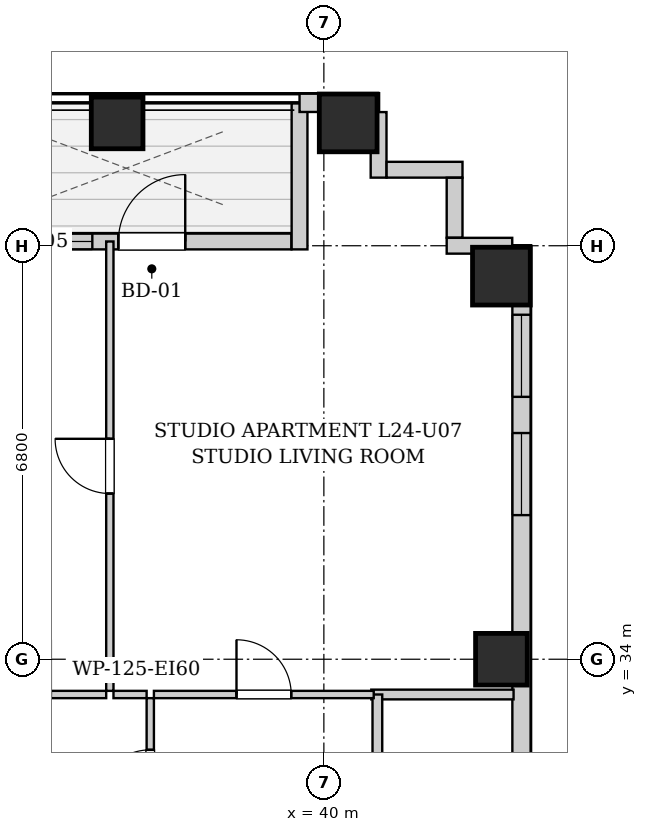
"""IFC4 building model, lengths in metres.
Left out: names, types, materials, properties, quantities, classifications, styles, units other than length and angle.
Written with IfcOpenShell. Run it as: python <this file> out.ifc"""

import sys

from ifc_helpers import new_model, si_unit, direction, frame, frame_2d, origin, origin_2d, place, context, subcontext, project, spatial, rectangle, extrude, element, fill, save


model = new_model("IFC4")
c1 = context("Model", 3, precision=1e-05, world=origin(), true_north=direction((0.0, 1.0)))
c2 = subcontext(c1, "Body", "Model", "MODEL_VIEW")
j1 = project(units=[si_unit("LENGTHUNIT", "METRE"), si_unit("PLANEANGLEUNIT", "RADIAN")], contexts=[c1])
p1 = place(None, origin())
s1 = spatial("IfcSite", under=j1, at=p1, CompositionType="ELEMENT")
p2 = place(p1, origin())
s2 = spatial("IfcBuilding", under=s1, at=p2, CompositionType="ELEMENT")
p3 = place(p2, frame((0.0, 0.0, 87.9)))
s3 = spatial("IfcBuildingStorey", under=s2, at=p3, CompositionType="ELEMENT", Elevation=87.9)
p4 = place(p3, frame((36.6, 42.82, 0.0), z_axis=(0.0, 0.0, 1.0), x_axis=(1.0, 0.0, 0.0)))
e1 = element("IfcColumn", 1, at=p4, inside=s3, PredefinedType="COLUMN", context=c2, shape_type="SweptSolid", body=[
    extrude(rectangle(XDim=0.85, YDim=0.85, at=origin_2d()), origin(), (0.0, 0.0, 1.0), 3.2),
])
p5 = place(p3, frame((40.4, 42.82, 0.0), z_axis=(0.0, 0.0, 1.0), x_axis=(1.0, 0.0, 0.0)))
e2 = element("IfcColumn", 2, at=p5, inside=s3, PredefinedType="COLUMN", context=c2, shape_type="SweptSolid", body=[
    extrude(rectangle(XDim=0.95, YDim=0.95, at=origin_2d()), origin(), (0.0, 0.0, 1.0), 3.2),
])
p6 = place(p3, frame((42.92, 34.0, 0.0), z_axis=(0.0, 0.0, 1.0), x_axis=(1.0, 0.0, 0.0)))
e3 = element("IfcColumn", 3, at=p6, inside=s3, PredefinedType="COLUMN", context=c2, shape_type="SweptSolid", body=[
    extrude(rectangle(XDim=0.85, YDim=0.85, at=origin_2d()), origin(), (0.0, 0.0, 1.0), 3.2),
])
p7 = place(p3, frame((42.92, 40.3, 0.0), z_axis=(0.0, 0.0, 1.0), x_axis=(1.0, 0.0, 0.0)))
e4 = element("IfcColumn", 4, at=p7, inside=s3, PredefinedType="COLUMN", context=c2, shape_type="SweptSolid", body=[
    extrude(rectangle(XDim=0.95, YDim=0.95, at=origin_2d()), origin(), (0.0, 0.0, 1.0), 3.2),
])
p8 = place(p3, frame((34.034, 40.87, 0.0), z_axis=(0.0, 0.0, 1.0), x_axis=(1.0, 0.0, 0.0)))
e5 = element("IfcWall", 5, at=p8, inside=s3, PredefinedType="SOLIDWALL", context=c2, shape_type="SweptSolid", body=[
    extrude(rectangle(XDim=5.432, YDim=0.26, at=frame_2d((2.716, 0.0))), origin(), (0.0, 0.0, 1.0), 2.94),
])
p9 = place(p8, frame((2.586, 0.0, 0.0)))
e6 = element("IfcOpeningElement", 6, at=p9, cuts=e5, PredefinedType="OPENING", context=c2, shape_type="SweptSolid", body=[
    extrude(rectangle(XDim=1.1, YDim=2.0, at=frame_2d((0.55, 1.0))), frame((0.0, 0.14, 0.0), z_axis=(0.0, -1.0, 0.0), x_axis=(1.0, 0.0, 0.0)), (0.0, 0.0, 1.0), 0.28),
])
p10 = place(p8, frame((0.558, 0.0, 0.85)))
e7 = element("IfcOpeningElement", 7, at=p10, cuts=e5, PredefinedType="OPENING", context=c2, shape_type="SweptSolid", body=[
    extrude(rectangle(XDim=1.6, YDim=1.65, at=frame_2d((0.8, 0.825))), frame((0.0, 0.14, 0.0), z_axis=(0.0, -1.0, 0.0), x_axis=(1.0, 0.0, 0.0)), (0.0, 0.0, 1.0), 0.28),
])
p11 = place(p3, frame((39.6, 40.74, 0.0), z_axis=(0.0, 0.0, 1.0), x_axis=(0.0, 1.0, 0.0)))
e8 = element("IfcWall", 8, at=p11, inside=s3, PredefinedType="SOLIDWALL", context=c2, shape_type="SweptSolid", body=[
    extrude(rectangle(XDim=2.4, YDim=0.26, at=frame_2d((1.2, 0.0))), origin(), (0.0, 0.0, 1.0), 2.94),
])
p12 = place(p3, frame((39.6, 43.15, 0.0), z_axis=(0.0, 0.0, 1.0), x_axis=(1.0, 0.0, 0.0)))
e9 = element("IfcWall", 9, at=p12, inside=s3, PredefinedType="SOLIDWALL", context=c2, shape_type="SweptSolid", body=[
    extrude(rectangle(XDim=1.3, YDim=0.3, at=frame_2d((0.65, 0.0))), origin(), (0.0, 0.0, 1.0), 2.94),
])
p13 = place(p3, frame((43.25, 40.8, 0.0), z_axis=(0.0, 0.0, 1.0), x_axis=(0.0, -1.0, 0.0)))
e10 = element("IfcWall", 10, at=p13, inside=s3, PredefinedType="SOLIDWALL", context=c2, shape_type="SweptSolid", body=[
    extrude(rectangle(XDim=38.3, YDim=0.3, at=frame_2d((19.15, 0.0))), origin(), (0.0, 0.0, 1.0), 2.94),
])
p14 = place(p13, frame((33.495, 0.0, 0.55)))
e11 = element("IfcOpeningElement", 11, at=p14, cuts=e10, PredefinedType="OPENING", context=c2, shape_type="SweptSolid", body=[
    extrude(rectangle(XDim=1.35, YDim=1.2, at=frame_2d((0.675, 0.6))), frame((0.0, 0.16, 0.0), z_axis=(0.0, -1.0, 0.0), x_axis=(1.0, 0.0, 0.0)), (0.0, 0.0, 1.0), 0.32),
])
p15 = place(p13, frame((31.785, 0.0, 0.55)))
e12 = element("IfcOpeningElement", 12, at=p15, cuts=e10, PredefinedType="OPENING", context=c2, shape_type="SweptSolid", body=[
    extrude(rectangle(XDim=1.35, YDim=1.2, at=frame_2d((0.675, 0.6))), frame((0.0, 0.16, 0.0), z_axis=(0.0, -1.0, 0.0), x_axis=(1.0, 0.0, 0.0)), (0.0, 0.0, 1.0), 0.32),
])
p16 = place(p13, frame((3.08, 0.0, 0.55)))
e13 = element("IfcOpeningElement", 13, at=p16, cuts=e10, PredefinedType="OPENING", context=c2, shape_type="SweptSolid", body=[
    extrude(rectangle(XDim=1.35, YDim=1.2, at=frame_2d((0.675, 0.6))), frame((0.0, 0.16, 0.0), z_axis=(0.0, -1.0, 0.0), x_axis=(1.0, 0.0, 0.0)), (0.0, 0.0, 1.0), 0.32),
])
p17 = place(p13, frame((1.135, 0.0, 0.55)))
e14 = element("IfcOpeningElement", 14, at=p17, cuts=e10, PredefinedType="OPENING", context=c2, shape_type="SweptSolid", body=[
    extrude(rectangle(XDim=1.35, YDim=1.2, at=frame_2d((0.675, 0.6))), frame((0.0, 0.16, 0.0), z_axis=(0.0, -1.0, 0.0), x_axis=(1.0, 0.0, 0.0)), (0.0, 0.0, 1.0), 0.32),
])
p18 = place(p13, frame((21.93, 0.0, 0.55)))
e15 = element("IfcOpeningElement", 15, at=p18, cuts=e10, PredefinedType="OPENING", context=c2, shape_type="SweptSolid", body=[
    extrude(rectangle(XDim=1.35, YDim=1.2, at=frame_2d((0.675, 0.6))), frame((0.0, 0.16, 0.0), z_axis=(0.0, -1.0, 0.0), x_axis=(1.0, 0.0, 0.0)), (0.0, 0.0, 1.0), 0.32),
])
p19 = place(p13, frame((23.54, 0.0, 0.55)))
e16 = element("IfcOpeningElement", 16, at=p19, cuts=e10, PredefinedType="OPENING", context=c2, shape_type="SweptSolid", body=[
    extrude(rectangle(XDim=1.35, YDim=1.2, at=frame_2d((0.675, 0.6))), frame((0.0, 0.16, 0.0), z_axis=(0.0, -1.0, 0.0), x_axis=(1.0, 0.0, 0.0)), (0.0, 0.0, 1.0), 0.32),
])
p20 = place(p13, frame((14.95, 0.0, 0.55)))
e17 = element("IfcOpeningElement", 17, at=p20, cuts=e10, PredefinedType="OPENING", context=c2, shape_type="SweptSolid", body=[
    extrude(rectangle(XDim=1.35, YDim=1.2, at=frame_2d((0.675, 0.6))), frame((0.0, 0.16, 0.0), z_axis=(0.0, -1.0, 0.0), x_axis=(1.0, 0.0, 0.0)), (0.0, 0.0, 1.0), 0.32),
])
p21 = place(p13, frame((12.385, 0.0, 0.55)))
e18 = element("IfcOpeningElement", 18, at=p21, cuts=e10, PredefinedType="OPENING", context=c2, shape_type="SweptSolid", body=[
    extrude(rectangle(XDim=1.35, YDim=1.2, at=frame_2d((0.675, 0.6))), frame((0.0, 0.16, 0.0), z_axis=(0.0, -1.0, 0.0), x_axis=(1.0, 0.0, 0.0)), (0.0, 0.0, 1.0), 0.32),
])
p22 = place(p3, frame((40.9, 42.998, 0.0), z_axis=(0.0, 0.0, 1.0), x_axis=(0.0, -1.0, 0.0)))
e19 = element("IfcWall", 19, at=p22, inside=s3, PredefinedType="SOLIDWALL", context=c2, shape_type="SweptSolid", body=[
    extrude(rectangle(XDim=1.078, YDim=0.26, at=frame_2d((0.539, 0.0))), origin(), (0.0, 0.0, 1.0), 2.94),
])
p23 = place(p3, frame((41.032, 42.05, 0.0), z_axis=(0.0, 0.0, 1.0), x_axis=(1.0, 0.0, 0.0)))
e20 = element("IfcWall", 20, at=p23, inside=s3, PredefinedType="SOLIDWALL", context=c2, shape_type="SweptSolid", body=[
    extrude(rectangle(XDim=1.248, YDim=0.26, at=frame_2d((0.624, 0.0))), origin(), (0.0, 0.0, 1.0), 2.94),
])
p24 = place(p3, frame((42.15, 41.918, 0.0), z_axis=(0.0, 0.0, 1.0), x_axis=(0.0, -1.0, 0.0)))
e21 = element("IfcWall", 21, at=p24, inside=s3, PredefinedType="SOLIDWALL", context=c2, shape_type="SweptSolid", body=[
    extrude(rectangle(XDim=0.986, YDim=0.26, at=frame_2d((0.493, 0.0))), origin(), (0.0, 0.0, 1.0), 2.94),
])
p25 = place(p3, frame((42.02, 40.8, 0.0), z_axis=(0.0, 0.0, 1.0), x_axis=(1.0, 0.0, 0.0)))
e22 = element("IfcWall", 22, at=p25, inside=s3, PredefinedType="SOLIDWALL", context=c2, shape_type="SweptSolid", body=[
    extrude(rectangle(XDim=1.078, YDim=0.26, at=frame_2d((0.539, 0.0))), origin(), (0.0, 0.0, 1.0), 2.94),
])
p26 = place(p3, frame((40.78, 33.42, 0.0), z_axis=(0.0, 0.0, 1.0), x_axis=(1.0, 0.0, 0.0)))
e23 = element("IfcWall", 23, at=p26, inside=s3, PredefinedType="PARTITIONING", context=c2, shape_type="SweptSolid", body=[
    extrude(rectangle(XDim=2.34, YDim=0.16, at=frame_2d((1.17, 0.0))), origin(), (0.0, 0.0, 1.0), 2.94),
])
p27 = place(p3, frame((40.88, 30.76, 0.0), z_axis=(0.0, 0.0, 1.0), x_axis=(0.0, 1.0, 0.0)))
e24 = element("IfcWall", 24, at=p27, inside=s3, PredefinedType="PARTITIONING", context=c2, shape_type="SweptSolid", body=[
    extrude(rectangle(XDim=2.66, YDim=0.16, at=frame_2d((1.33, 0.0))), origin(), (0.0, 0.0, 1.0), 2.94),
])
p28 = place(p3, frame((37.145, 30.76, 0.0), z_axis=(0.0, 0.0, 1.0), x_axis=(0.0, 1.0, 0.0)))
e25 = element("IfcWall", 25, at=p28, inside=s3, PredefinedType="PARTITIONING", context=c2, shape_type="SweptSolid", body=[
    extrude(rectangle(XDim=2.6, YDim=0.12, at=frame_2d((1.3, 0.0))), origin(), (0.0, 0.0, 1.0), 2.94),
])
p29 = place(p28, frame((0.85, 0.0, 0.0)))
e26 = element("IfcOpeningElement", 26, at=p29, cuts=e25, PredefinedType="OPENING", context=c2, shape_type="SweptSolid", body=[
    extrude(rectangle(XDim=0.9, YDim=2.05, at=frame_2d((0.45, 1.025))), frame((0.0, 0.07, 0.0), z_axis=(0.0, -1.0, 0.0), x_axis=(1.0, 0.0, 0.0)), (0.0, 0.0, 1.0), 0.14),
])
p30 = place(p3, frame((33.7, 33.42, 0.0), z_axis=(0.0, 0.0, 1.0), x_axis=(1.0, 0.0, 0.0)))
e27 = element("IfcWall", 27, at=p30, inside=s3, PredefinedType="PARTITIONING", context=c2, shape_type="SweptSolid", body=[
    extrude(rectangle(XDim=2.72, YDim=0.12, at=frame_2d((1.36, 0.0))), origin(), (0.0, 0.0, 1.0), 2.94),
])
p31 = place(p30, frame((0.91, 0.0, 0.0)))
e28 = element("IfcOpeningElement", 28, at=p31, cuts=e27, PredefinedType="OPENING", context=c2, shape_type="SweptSolid", body=[
    extrude(rectangle(XDim=0.9, YDim=2.05, at=frame_2d((0.45, 1.025))), frame((0.0, 0.07, 0.0), z_axis=(0.0, -1.0, 0.0), x_axis=(1.0, 0.0, 0.0)), (0.0, 0.0, 1.0), 0.14),
])
p32 = place(p3, frame((36.54, 33.42, 0.0), z_axis=(0.0, 0.0, 1.0), x_axis=(1.0, 0.0, 0.0)))
e29 = element("IfcWall", 29, at=p32, inside=s3, PredefinedType="PARTITIONING", context=c2, shape_type="SweptSolid", body=[
    extrude(rectangle(XDim=0.545, YDim=0.12, at=frame_2d((0.272, 0.0))), origin(), (0.0, 0.0, 1.0), 2.94),
])
p33 = place(p3, frame((37.205, 33.42, 0.0), z_axis=(0.0, 0.0, 1.0), x_axis=(1.0, 0.0, 0.0)))
e30 = element("IfcWall", 30, at=p33, inside=s3, PredefinedType="PARTITIONING", context=c2, shape_type="SweptSolid", body=[
    extrude(rectangle(XDim=3.615, YDim=0.12, at=frame_2d((1.808, 0.0))), origin(), (0.0, 0.0, 1.0), 2.94),
])
p34 = place(p33, frame((1.358, 0.0, 0.0)))
e31 = element("IfcOpeningElement", 31, at=p34, cuts=e30, PredefinedType="OPENING", context=c2, shape_type="SweptSolid", body=[
    extrude(rectangle(XDim=0.9, YDim=2.05, at=frame_2d((0.45, 1.025))), frame((0.0, 0.07, 0.0), z_axis=(0.0, -1.0, 0.0), x_axis=(1.0, 0.0, 0.0)), (0.0, 0.0, 1.0), 0.14),
])
p35 = place(p3, frame((36.48, 33.48, 0.0), z_axis=(0.0, 0.0, 1.0), x_axis=(0.0, 1.0, 0.0)))
e32 = element("IfcWall", 32, at=p35, inside=s3, PredefinedType="PARTITIONING", context=c2, shape_type="SweptSolid", body=[
    extrude(rectangle(XDim=7.39, YDim=0.12, at=frame_2d((3.695, 0.0))), origin(), (0.0, 0.0, 1.0), 2.94),
])
p36 = place(p35, frame((3.245, 0.0, 0.0)))
e33 = element("IfcOpeningElement", 33, at=p36, cuts=e32, PredefinedType="OPENING", context=c2, shape_type="SweptSolid", body=[
    extrude(rectangle(XDim=0.9, YDim=2.05, at=frame_2d((0.45, 1.025))), frame((0.0, 0.07, 0.0), z_axis=(0.0, -1.0, 0.0), x_axis=(1.0, 0.0, 0.0)), (0.0, 0.0, 1.0), 0.14),
])
p37 = place(p29, origin())
e34 = element("IfcDoor", 34, at=p37, inside=s3, OperationType="SINGLE_SWING_LEFT", PredefinedType="DOOR", context=c2, shape_type="SweptSolid", body=[
    extrude(rectangle(XDim=0.9, YDim=2.05, at=frame_2d((0.45, 1.025))), frame((0.0, 0.025, 0.0), z_axis=(0.0, -1.0, 0.0), x_axis=(1.0, 0.0, 0.0)), (0.0, 0.0, 1.0), 0.05),
])
fill(e26, e34)
p38 = place(p34, origin())
e35 = element("IfcDoor", 35, at=p38, inside=s3, OperationType="SINGLE_SWING_LEFT", PredefinedType="DOOR", context=c2, shape_type="SweptSolid", body=[
    extrude(rectangle(XDim=0.9, YDim=2.05, at=frame_2d((0.45, 1.025))), frame((0.0, 0.025, 0.0), z_axis=(0.0, -1.0, 0.0), x_axis=(1.0, 0.0, 0.0)), (0.0, 0.0, 1.0), 0.05),
])
fill(e31, e35)
p39 = place(p36, origin())
e36 = element("IfcDoor", 36, at=p39, inside=s3, OperationType="SINGLE_SWING_RIGHT", PredefinedType="DOOR", context=c2, shape_type="SweptSolid", body=[
    extrude(rectangle(XDim=0.9, YDim=2.05, at=frame_2d((0.45, 1.025))), frame((0.0, 0.025, 0.0), z_axis=(0.0, -1.0, 0.0), x_axis=(1.0, 0.0, 0.0)), (0.0, 0.0, 1.0), 0.05),
])
fill(e33, e36)
p40 = place(p9, origin())
e37 = element("IfcDoor", 37, at=p40, inside=s3, OperationType="SINGLE_SWING_RIGHT", PredefinedType="DOOR", context=c2, shape_type="SweptSolid", body=[
    extrude(rectangle(XDim=1.1, YDim=2.0, at=frame_2d((0.55, 1.0))), frame((0.0, 0.025, 0.0), z_axis=(0.0, -1.0, 0.0), x_axis=(1.0, 0.0, 0.0)), (0.0, 0.0, 1.0), 0.05),
])
fill(e6, e37)
p41 = place(p10, origin())
e38 = element("IfcWindow", 38, at=p41, inside=s3, PartitioningType="DOUBLE_PANEL_VERTICAL", PredefinedType="WINDOW", context=c2, shape_type="SweptSolid", body=[
    extrude(rectangle(XDim=1.6, YDim=1.65, at=frame_2d((0.8, 0.825))), frame((0.0, 0.03, 0.0), z_axis=(0.0, -1.0, 0.0), x_axis=(1.0, 0.0, 0.0)), (0.0, 0.0, 1.0), 0.06),
])
fill(e7, e38)
p42 = place(p16, origin())
e39 = element("IfcWindow", 39, at=p42, inside=s3, PartitioningType="SINGLE_PANEL", PredefinedType="WINDOW", context=c2, shape_type="SweptSolid", body=[
    extrude(rectangle(XDim=1.35, YDim=1.2, at=frame_2d((0.675, 0.6))), frame((0.0, 0.03, 0.0), z_axis=(0.0, -1.0, 0.0), x_axis=(1.0, 0.0, 0.0)), (0.0, 0.0, 1.0), 0.06),
])
fill(e13, e39)
p43 = place(p17, origin())
e40 = element("IfcWindow", 40, at=p43, inside=s3, PartitioningType="SINGLE_PANEL", PredefinedType="WINDOW", context=c2, shape_type="SweptSolid", body=[
    extrude(rectangle(XDim=1.35, YDim=1.2, at=frame_2d((0.675, 0.6))), frame((0.0, 0.03, 0.0), z_axis=(0.0, -1.0, 0.0), x_axis=(1.0, 0.0, 0.0)), (0.0, 0.0, 1.0), 0.06),
])
fill(e14, e40)
save(model, sys.argv[1])
